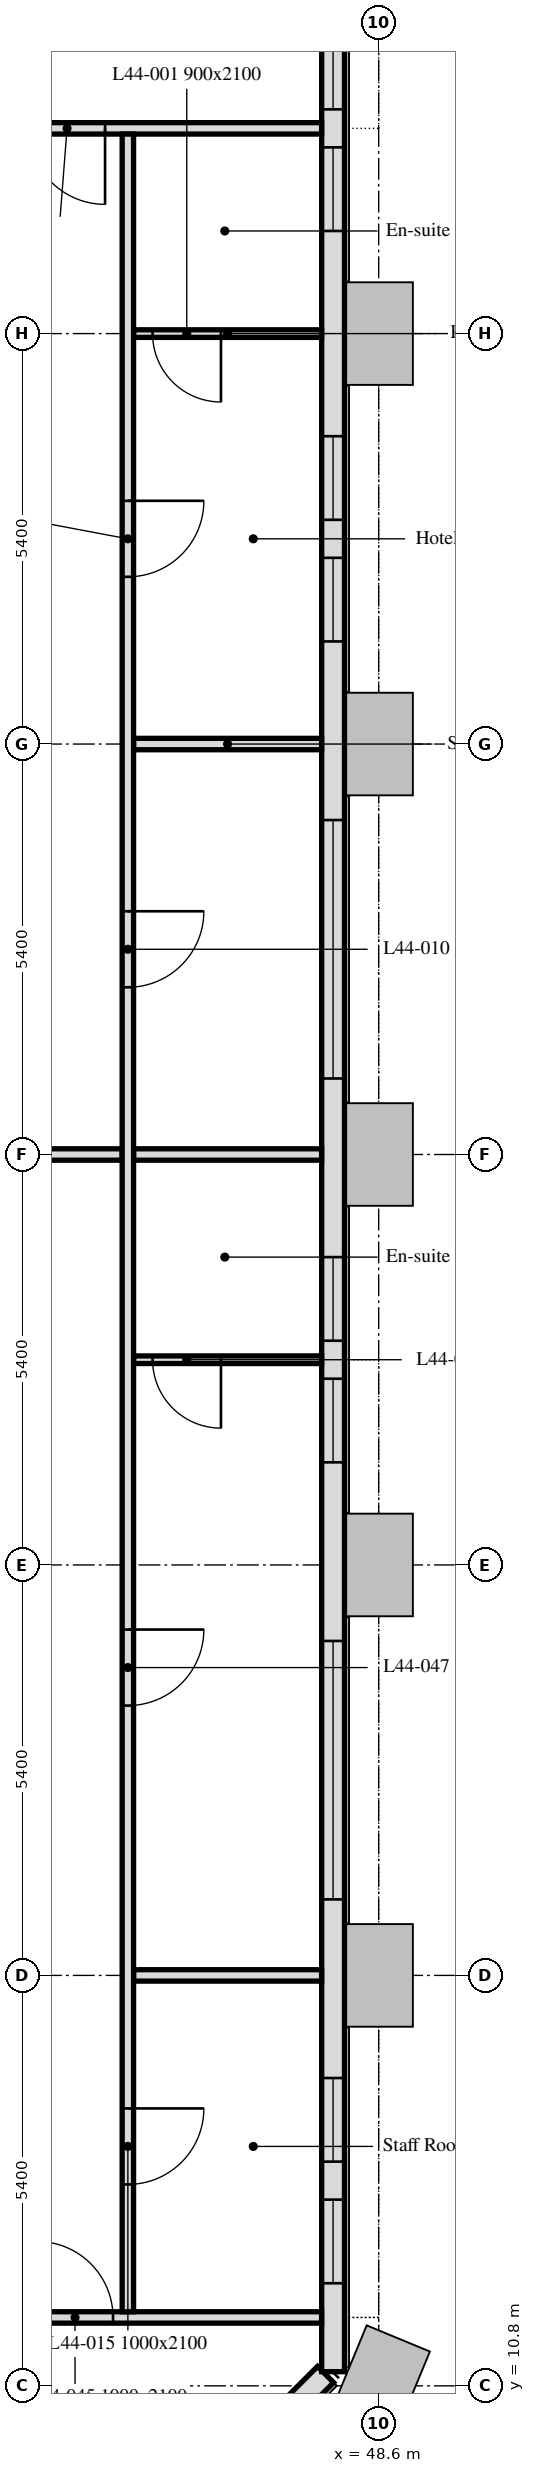
"""IFC4 building model, lengths in metres.
Left out: names, types, materials, properties, quantities, classifications, styles, units other than length and angle.
Written with IfcOpenShell. Run it as: python <this file> out.ifc"""

import sys

from ifc_helpers import new_model, si_unit, direction, frame, frame_2d, origin, place, context, subcontext, project, spatial, rectangle, extrude, element, fill, save


model = new_model("IFC4")
c1 = context("Model", 3, precision=1e-05, world=origin(), true_north=direction((0.0, 1.0)))
c2 = subcontext(c1, "Body", "Model", "MODEL_VIEW")
j1 = project(units=[si_unit("LENGTHUNIT", "METRE"), si_unit("PLANEANGLEUNIT", "RADIAN")], contexts=[c1])
p1 = place(None, origin())
s1 = spatial("IfcSite", under=j1, at=p1, CompositionType="ELEMENT")
p2 = place(p1, origin())
s2 = spatial("IfcBuilding", under=s1, at=p2, CompositionType="ELEMENT")
p3 = place(p2, frame((0.0, 0.0, 184.0)))
s3 = spatial("IfcBuildingStorey", under=s2, at=p3, CompositionType="ELEMENT", Elevation=184.0)
p4 = place(p3, frame((43.051, 6.099, 0.0), z_axis=(0.0, 0.0, 1.0), x_axis=(0.707106781187, 0.707106781187, 0.0)))
e1 = element("IfcWall", 1, at=p4, inside=s3, PredefinedType="SOLIDWALL", context=c2, shape_type="SweptSolid", body=[
    extrude(rectangle(XDim=6.86, YDim=0.3, at=frame_2d((3.43, 0.0))), origin(), (0.0, 0.0, 1.0), 3.0),
])
p5 = place(p4, frame((1.28, 0.0, 0.9)))
e2 = element("IfcOpeningElement", 2, at=p5, cuts=e1, PredefinedType="OPENING", context=c2, shape_type="SweptSolid", body=[
    extrude(rectangle(XDim=1.1, YDim=1.7, at=frame_2d((0.55, 0.85))), frame((0.0, 0.16, 0.0), z_axis=(0.0, -1.0, 0.0), x_axis=(1.0, 0.0, 0.0)), (0.0, 0.0, 1.0), 0.32),
])
p6 = place(p4, frame((4.48, 0.0, 0.9)))
e3 = element("IfcOpeningElement", 3, at=p6, cuts=e1, PredefinedType="OPENING", context=c2, shape_type="SweptSolid", body=[
    extrude(rectangle(XDim=1.1, YDim=1.7, at=frame_2d((0.55, 0.85))), frame((0.0, 0.16, 0.0), z_axis=(0.0, -1.0, 0.0), x_axis=(1.0, 0.0, 0.0)), (0.0, 0.0, 1.0), 0.32),
])
p7 = place(p3, frame((48.0, 10.986, 0.0), z_axis=(0.0, 0.0, 1.0), x_axis=(0.0, 1.0, 0.0)))
e4 = element("IfcWall", 4, at=p7, inside=s3, PredefinedType="SOLIDWALL", context=c2, shape_type="SweptSolid", body=[
    extrude(rectangle(XDim=32.027, YDim=0.3, at=frame_2d((16.014, 0.0))), origin(), (0.0, 0.0, 1.0), 3.0),
])
p8 = place(p7, frame((1.164, 0.0, 0.9)))
e5 = element("IfcOpeningElement", 5, at=p8, cuts=e4, PredefinedType="OPENING", context=c2, shape_type="SweptSolid", body=[
    extrude(rectangle(XDim=1.1, YDim=1.7, at=frame_2d((0.55, 0.85))), frame((0.0, 0.16, 0.0), z_axis=(0.0, -1.0, 0.0), x_axis=(1.0, 0.0, 0.0)), (0.0, 0.0, 1.0), 0.32),
])
p9 = place(p7, frame((2.764, 0.0, 0.9)))
e6 = element("IfcOpeningElement", 6, at=p9, cuts=e4, PredefinedType="OPENING", context=c2, shape_type="SweptSolid", body=[
    extrude(rectangle(XDim=1.1, YDim=1.7, at=frame_2d((0.55, 0.85))), frame((0.0, 0.16, 0.0), z_axis=(0.0, -1.0, 0.0), x_axis=(1.0, 0.0, 0.0)), (0.0, 0.0, 1.0), 0.32),
])
p10 = place(p7, frame((6.214, 0.0, 0.9)))
e7 = element("IfcOpeningElement", 7, at=p10, cuts=e4, PredefinedType="OPENING", context=c2, shape_type="SweptSolid", body=[
    extrude(rectangle(XDim=3.4, YDim=1.7, at=frame_2d((1.7, 0.85))), frame((0.0, 0.16, 0.0), z_axis=(0.0, -1.0, 0.0), x_axis=(1.0, 0.0, 0.0)), (0.0, 0.0, 1.0), 0.32),
])
p11 = place(p7, frame((11.964, 0.0, 0.9)))
e8 = element("IfcOpeningElement", 8, at=p11, cuts=e4, PredefinedType="OPENING", context=c2, shape_type="SweptSolid", body=[
    extrude(rectangle(XDim=1.1, YDim=1.7, at=frame_2d((0.55, 0.85))), frame((0.0, 0.16, 0.0), z_axis=(0.0, -1.0, 0.0), x_axis=(1.0, 0.0, 0.0)), (0.0, 0.0, 1.0), 0.32),
])
p12 = place(p7, frame((13.564, 0.0, 0.9)))
e9 = element("IfcOpeningElement", 9, at=p12, cuts=e4, PredefinedType="OPENING", context=c2, shape_type="SweptSolid", body=[
    extrude(rectangle(XDim=1.1, YDim=1.7, at=frame_2d((0.55, 0.85))), frame((0.0, 0.16, 0.0), z_axis=(0.0, -1.0, 0.0), x_axis=(1.0, 0.0, 0.0)), (0.0, 0.0, 1.0), 0.32),
])
p13 = place(p7, frame((17.014, 0.0, 0.9)))
e10 = element("IfcOpeningElement", 10, at=p13, cuts=e4, PredefinedType="OPENING", context=c2, shape_type="SweptSolid", body=[
    extrude(rectangle(XDim=3.4, YDim=1.7, at=frame_2d((1.7, 0.85))), frame((0.0, 0.16, 0.0), z_axis=(0.0, -1.0, 0.0), x_axis=(1.0, 0.0, 0.0)), (0.0, 0.0, 1.0), 0.32),
])
p14 = place(p7, frame((22.764, 0.0, 0.9)))
e11 = element("IfcOpeningElement", 11, at=p14, cuts=e4, PredefinedType="OPENING", context=c2, shape_type="SweptSolid", body=[
    extrude(rectangle(XDim=1.1, YDim=1.7, at=frame_2d((0.55, 0.85))), frame((0.0, 0.16, 0.0), z_axis=(0.0, -1.0, 0.0), x_axis=(1.0, 0.0, 0.0)), (0.0, 0.0, 1.0), 0.32),
])
p15 = place(p7, frame((24.364, 0.0, 0.9)))
e12 = element("IfcOpeningElement", 12, at=p15, cuts=e4, PredefinedType="OPENING", context=c2, shape_type="SweptSolid", body=[
    extrude(rectangle(XDim=1.1, YDim=1.7, at=frame_2d((0.55, 0.85))), frame((0.0, 0.16, 0.0), z_axis=(0.0, -1.0, 0.0), x_axis=(1.0, 0.0, 0.0)), (0.0, 0.0, 1.0), 0.32),
])
p16 = place(p7, frame((28.164, 0.0, 0.9)))
e13 = element("IfcOpeningElement", 13, at=p16, cuts=e4, PredefinedType="OPENING", context=c2, shape_type="SweptSolid", body=[
    extrude(rectangle(XDim=1.1, YDim=1.7, at=frame_2d((0.55, 0.85))), frame((0.0, 0.16, 0.0), z_axis=(0.0, -1.0, 0.0), x_axis=(1.0, 0.0, 0.0)), (0.0, 0.0, 1.0), 0.32),
])
p17 = place(p7, frame((29.764, 0.0, 0.9)))
e14 = element("IfcOpeningElement", 14, at=p17, cuts=e4, PredefinedType="OPENING", context=c2, shape_type="SweptSolid", body=[
    extrude(rectangle(XDim=1.1, YDim=1.7, at=frame_2d((0.55, 0.85))), frame((0.0, 0.16, 0.0), z_axis=(0.0, -1.0, 0.0), x_axis=(1.0, 0.0, 0.0)), (0.0, 0.0, 1.0), 0.32),
])
p18 = place(p3, frame((45.375, 32.4, 0.0), z_axis=(0.0, 0.0, 1.0), x_axis=(1.0, 0.0, 0.0)))
e15 = element("IfcWall", 15, at=p18, inside=s3, PredefinedType="PARTITIONING", context=c2, shape_type="SweptSolid", body=[
    extrude(rectangle(XDim=2.474, YDim=0.15, at=frame_2d((1.237, 0.0))), origin(), (0.0, 0.0, 1.0), 2.4),
])
p19 = place(p3, frame((47.849, 37.8, 0.0), z_axis=(0.0, 0.0, 1.0), x_axis=(-1.0, 0.0, 0.0)))
e16 = element("IfcWall", 16, at=p19, inside=s3, PredefinedType="PARTITIONING", context=c2, shape_type="SweptSolid", body=[
    extrude(rectangle(XDim=2.474, YDim=0.1, at=frame_2d((1.237, 0.0))), origin(), (0.0, 0.0, 1.0), 2.4),
])
p20 = place(p19, frame((1.324, 0.0, 0.0)))
e17 = element("IfcOpeningElement", 17, at=p20, cuts=e16, PredefinedType="OPENING", context=c2, shape_type="SweptSolid", body=[
    extrude(rectangle(XDim=0.9, YDim=2.1, at=frame_2d((0.45, 1.05))), frame((0.0, 0.05, 0.0), z_axis=(0.0, -1.0, 0.0), x_axis=(1.0, 0.0, 0.0)), (0.0, 0.0, 1.0), 0.1),
])
p21 = place(p3, frame((47.849, 40.5, 0.0), z_axis=(0.0, 0.0, 1.0), x_axis=(-1.0, 0.0, 0.0)))
e18 = element("IfcWall", 18, at=p21, inside=s3, PredefinedType="PARTITIONING", context=c2, shape_type="SweptSolid", body=[
    extrude(rectangle(XDim=41.698, YDim=0.15, at=frame_2d((20.849, 0.0))), origin(), (0.0, 0.0, 1.0), 2.4),
])
p22 = place(p21, frame((37.899, 0.0, 0.0)))
e19 = element("IfcOpeningElement", 19, at=p22, cuts=e18, PredefinedType="OPENING", context=c2, shape_type="SweptSolid", body=[
    extrude(rectangle(XDim=1.0, YDim=2.1, at=frame_2d((0.5, 1.05))), frame((0.0, 0.075, 0.0), z_axis=(0.0, -1.0, 0.0), x_axis=(1.0, 0.0, 0.0)), (0.0, 0.0, 1.0), 0.15),
])
p23 = place(p21, frame((32.499, 0.0, 0.0)))
e20 = element("IfcOpeningElement", 20, at=p23, cuts=e18, PredefinedType="OPENING", context=c2, shape_type="SweptSolid", body=[
    extrude(rectangle(XDim=1.0, YDim=2.1, at=frame_2d((0.5, 1.05))), frame((0.0, 0.075, 0.0), z_axis=(0.0, -1.0, 0.0), x_axis=(1.0, 0.0, 0.0)), (0.0, 0.0, 1.0), 0.15),
])
p24 = place(p21, frame((27.099, 0.0, 0.0)))
e21 = element("IfcOpeningElement", 21, at=p24, cuts=e18, PredefinedType="OPENING", context=c2, shape_type="SweptSolid", body=[
    extrude(rectangle(XDim=1.0, YDim=2.1, at=frame_2d((0.5, 1.05))), frame((0.0, 0.075, 0.0), z_axis=(0.0, -1.0, 0.0), x_axis=(1.0, 0.0, 0.0)), (0.0, 0.0, 1.0), 0.15),
])
p25 = place(p21, frame((21.699, 0.0, 0.0)))
e22 = element("IfcOpeningElement", 22, at=p25, cuts=e18, PredefinedType="OPENING", context=c2, shape_type="SweptSolid", body=[
    extrude(rectangle(XDim=1.0, YDim=2.1, at=frame_2d((0.5, 1.05))), frame((0.0, 0.075, 0.0), z_axis=(0.0, -1.0, 0.0), x_axis=(1.0, 0.0, 0.0)), (0.0, 0.0, 1.0), 0.15),
])
p26 = place(p21, frame((16.299, 0.0, 0.0)))
e23 = element("IfcOpeningElement", 23, at=p26, cuts=e18, PredefinedType="OPENING", context=c2, shape_type="SweptSolid", body=[
    extrude(rectangle(XDim=1.0, YDim=2.1, at=frame_2d((0.5, 1.05))), frame((0.0, 0.075, 0.0), z_axis=(0.0, -1.0, 0.0), x_axis=(1.0, 0.0, 0.0)), (0.0, 0.0, 1.0), 0.15),
])
p27 = place(p21, frame((10.899, 0.0, 0.0)))
e24 = element("IfcOpeningElement", 24, at=p27, cuts=e18, PredefinedType="OPENING", context=c2, shape_type="SweptSolid", body=[
    extrude(rectangle(XDim=1.0, YDim=2.1, at=frame_2d((0.5, 1.05))), frame((0.0, 0.075, 0.0), z_axis=(0.0, -1.0, 0.0), x_axis=(1.0, 0.0, 0.0)), (0.0, 0.0, 1.0), 0.15),
])
p28 = place(p21, frame((2.849, 0.0, 0.0)))
e25 = element("IfcOpeningElement", 25, at=p28, cuts=e18, PredefinedType="OPENING", context=c2, shape_type="SweptSolid", body=[
    extrude(rectangle(XDim=1.0, YDim=2.1, at=frame_2d((0.5, 1.05))), frame((0.0, 0.075, 0.0), z_axis=(0.0, -1.0, 0.0), x_axis=(1.0, 0.0, 0.0)), (0.0, 0.0, 1.0), 0.15),
])
p29 = place(p3, frame((45.375, 27.0, 0.0), z_axis=(0.0, 0.0, 1.0), x_axis=(1.0, 0.0, 0.0)))
e26 = element("IfcWall", 26, at=p29, inside=s3, PredefinedType="PARTITIONING", context=c2, shape_type="SweptSolid", body=[
    extrude(rectangle(XDim=2.474, YDim=0.15, at=frame_2d((1.237, 0.0))), origin(), (0.0, 0.0, 1.0), 2.4),
])
p30 = place(p3, frame((43.2, 27.0, 0.0), z_axis=(0.0, 0.0, 1.0), x_axis=(1.0, 0.0, 0.0)))
e27 = element("IfcWall", 27, at=p30, inside=s3, PredefinedType="PARTITIONING", context=c2, shape_type="SweptSolid", body=[
    extrude(rectangle(XDim=2.025, YDim=0.15, at=frame_2d((1.013, 0.0))), origin(), (0.0, 0.0, 1.0), 2.4),
])
p31 = place(p3, frame((47.849, 16.2, 0.0), z_axis=(0.0, 0.0, 1.0), x_axis=(-1.0, 0.0, 0.0)))
e28 = element("IfcWall", 28, at=p31, inside=s3, PredefinedType="PARTITIONING", context=c2, shape_type="SweptSolid", body=[
    extrude(rectangle(XDim=2.474, YDim=0.15, at=frame_2d((1.237, 0.0))), origin(), (0.0, 0.0, 1.0), 2.4),
])
p32 = place(p3, frame((6.151, 11.7, 0.0), z_axis=(0.0, 0.0, 1.0), x_axis=(1.0, 0.0, 0.0)))
e29 = element("IfcWall", 29, at=p32, inside=s3, PredefinedType="PARTITIONING", context=c2, shape_type="SweptSolid", body=[
    extrude(rectangle(XDim=41.698, YDim=0.15, at=frame_2d((20.849, 0.0))), origin(), (0.0, 0.0, 1.0), 3.0),
])
p33 = place(p32, frame((1.449, 0.0, 0.0)))
e30 = element("IfcOpeningElement", 30, at=p33, cuts=e29, PredefinedType="OPENING", context=c2, shape_type="SweptSolid", body=[
    extrude(rectangle(XDim=1.0, YDim=2.1, at=frame_2d((0.5, 1.05))), frame((0.0, 0.075, 0.0), z_axis=(0.0, -1.0, 0.0), x_axis=(1.0, 0.0, 0.0)), (0.0, 0.0, 1.0), 0.15),
])
p34 = place(p32, frame((37.954, 0.0, 0.0)))
e31 = element("IfcOpeningElement", 31, at=p34, cuts=e29, PredefinedType="OPENING", context=c2, shape_type="SweptSolid", body=[
    extrude(rectangle(XDim=1.0, YDim=2.1, at=frame_2d((0.5, 1.05))), frame((0.0, 0.075, 0.0), z_axis=(0.0, -1.0, 0.0), x_axis=(1.0, 0.0, 0.0)), (0.0, 0.0, 1.0), 0.15),
])
p35 = place(p32, frame((12.449, 0.0, 0.0)))
e32 = element("IfcOpeningElement", 32, at=p35, cuts=e29, PredefinedType="OPENING", context=c2, shape_type="SweptSolid", body=[
    extrude(rectangle(XDim=1.0, YDim=2.1, at=frame_2d((0.5, 1.05))), frame((0.0, 0.075, 0.0), z_axis=(0.0, -1.0, 0.0), x_axis=(1.0, 0.0, 0.0)), (0.0, 0.0, 1.0), 0.15),
])
p36 = place(p32, frame((23.249, 0.0, 0.0)))
e33 = element("IfcOpeningElement", 33, at=p36, cuts=e29, PredefinedType="OPENING", context=c2, shape_type="SweptSolid", body=[
    extrude(rectangle(XDim=1.0, YDim=2.1, at=frame_2d((0.5, 1.05))), frame((0.0, 0.075, 0.0), z_axis=(0.0, -1.0, 0.0), x_axis=(1.0, 0.0, 0.0)), (0.0, 0.0, 1.0), 0.15),
])
p37 = place(p3, frame((47.849, 24.3, 0.0), z_axis=(0.0, 0.0, 1.0), x_axis=(-1.0, 0.0, 0.0)))
e34 = element("IfcWall", 34, at=p37, inside=s3, PredefinedType="PARTITIONING", context=c2, shape_type="SweptSolid", body=[
    extrude(rectangle(XDim=2.474, YDim=0.1, at=frame_2d((1.237, 0.0))), origin(), (0.0, 0.0, 1.0), 3.0),
])
p38 = place(p37, frame((1.324, 0.0, 0.0)))
e35 = element("IfcOpeningElement", 35, at=p38, cuts=e34, PredefinedType="OPENING", context=c2, shape_type="SweptSolid", body=[
    extrude(rectangle(XDim=0.9, YDim=2.1, at=frame_2d((0.45, 1.05))), frame((0.0, 0.05, 0.0), z_axis=(0.0, -1.0, 0.0), x_axis=(1.0, 0.0, 0.0)), (0.0, 0.0, 1.0), 0.1),
])
p39 = place(p3, frame((45.3, 40.425, 0.0), z_axis=(0.0, 0.0, 1.0), x_axis=(0.0, -1.0, 0.0)))
e36 = element("IfcWall", 36, at=p39, inside=s3, PredefinedType="PARTITIONING", context=c2, shape_type="SweptSolid", body=[
    extrude(rectangle(XDim=28.65, YDim=0.15, at=frame_2d((14.325, 0.0))), origin(), (0.0, 0.0, 1.0), 2.4),
])
p40 = place(p39, frame((10.225, 0.0, 0.0)))
e37 = element("IfcOpeningElement", 37, at=p40, cuts=e36, PredefinedType="OPENING", context=c2, shape_type="SweptSolid", body=[
    extrude(rectangle(XDim=1.0, YDim=2.1, at=frame_2d((0.5, 1.05))), frame((0.0, 0.075, 0.0), z_axis=(0.0, -1.0, 0.0), x_axis=(1.0, 0.0, 0.0)), (0.0, 0.0, 1.0), 0.15),
])
p41 = place(p39, frame((25.975, 0.0, 0.0)))
e38 = element("IfcOpeningElement", 38, at=p41, cuts=e36, PredefinedType="OPENING", context=c2, shape_type="SweptSolid", body=[
    extrude(rectangle(XDim=1.0, YDim=2.1, at=frame_2d((0.5, 1.05))), frame((0.0, 0.075, 0.0), z_axis=(0.0, -1.0, 0.0), x_axis=(1.0, 0.0, 0.0)), (0.0, 0.0, 1.0), 0.15),
])
p42 = place(p39, frame((4.825, 0.0, 0.0)))
e39 = element("IfcOpeningElement", 39, at=p42, cuts=e36, PredefinedType="OPENING", context=c2, shape_type="SweptSolid", body=[
    extrude(rectangle(XDim=1.0, YDim=2.1, at=frame_2d((0.5, 1.05))), frame((0.0, 0.075, 0.0), z_axis=(0.0, -1.0, 0.0), x_axis=(1.0, 0.0, 0.0)), (0.0, 0.0, 1.0), 0.15),
])
p43 = place(p39, frame((19.675, 0.0, 0.0)))
e40 = element("IfcOpeningElement", 40, at=p43, cuts=e36, PredefinedType="OPENING", context=c2, shape_type="SweptSolid", body=[
    extrude(rectangle(XDim=1.0, YDim=2.1, at=frame_2d((0.5, 1.05))), frame((0.0, 0.075, 0.0), z_axis=(0.0, -1.0, 0.0), x_axis=(1.0, 0.0, 0.0)), (0.0, 0.0, 1.0), 0.15),
])
p44 = place(p8, origin())
e41 = element("IfcWindow", 41, at=p44, inside=s3, PartitioningType="SINGLE_PANEL", PredefinedType="WINDOW", context=c2, shape_type="SweptSolid", body=[
    extrude(rectangle(XDim=1.1, YDim=1.7, at=frame_2d((0.55, 0.85))), frame((0.0, 0.03, 0.0), z_axis=(0.0, -1.0, 0.0), x_axis=(1.0, 0.0, 0.0)), (0.0, 0.0, 1.0), 0.06),
])
fill(e5, e41)
p45 = place(p9, origin())
e42 = element("IfcWindow", 42, at=p45, inside=s3, PartitioningType="SINGLE_PANEL", PredefinedType="WINDOW", context=c2, shape_type="SweptSolid", body=[
    extrude(rectangle(XDim=1.1, YDim=1.7, at=frame_2d((0.55, 0.85))), frame((0.0, 0.03, 0.0), z_axis=(0.0, -1.0, 0.0), x_axis=(1.0, 0.0, 0.0)), (0.0, 0.0, 1.0), 0.06),
])
fill(e6, e42)
p46 = place(p10, origin())
e43 = element("IfcWindow", 43, at=p46, inside=s3, PartitioningType="SINGLE_PANEL", PredefinedType="WINDOW", context=c2, shape_type="SweptSolid", body=[
    extrude(rectangle(XDim=3.4, YDim=1.7, at=frame_2d((1.7, 0.85))), frame((0.0, 0.03, 0.0), z_axis=(0.0, -1.0, 0.0), x_axis=(1.0, 0.0, 0.0)), (0.0, 0.0, 1.0), 0.06),
])
fill(e7, e43)
p47 = place(p11, origin())
e44 = element("IfcWindow", 44, at=p47, inside=s3, PartitioningType="SINGLE_PANEL", PredefinedType="WINDOW", context=c2, shape_type="SweptSolid", body=[
    extrude(rectangle(XDim=1.1, YDim=1.7, at=frame_2d((0.55, 0.85))), frame((0.0, 0.03, 0.0), z_axis=(0.0, -1.0, 0.0), x_axis=(1.0, 0.0, 0.0)), (0.0, 0.0, 1.0), 0.06),
])
fill(e8, e44)
p48 = place(p12, origin())
e45 = element("IfcWindow", 45, at=p48, inside=s3, PartitioningType="SINGLE_PANEL", PredefinedType="WINDOW", context=c2, shape_type="SweptSolid", body=[
    extrude(rectangle(XDim=1.1, YDim=1.7, at=frame_2d((0.55, 0.85))), frame((0.0, 0.03, 0.0), z_axis=(0.0, -1.0, 0.0), x_axis=(1.0, 0.0, 0.0)), (0.0, 0.0, 1.0), 0.06),
])
fill(e9, e45)
p49 = place(p13, origin())
e46 = element("IfcWindow", 46, at=p49, inside=s3, PartitioningType="SINGLE_PANEL", PredefinedType="WINDOW", context=c2, shape_type="SweptSolid", body=[
    extrude(rectangle(XDim=3.4, YDim=1.7, at=frame_2d((1.7, 0.85))), frame((0.0, 0.03, 0.0), z_axis=(0.0, -1.0, 0.0), x_axis=(1.0, 0.0, 0.0)), (0.0, 0.0, 1.0), 0.06),
])
fill(e10, e46)
p50 = place(p14, origin())
e47 = element("IfcWindow", 47, at=p50, inside=s3, PartitioningType="SINGLE_PANEL", PredefinedType="WINDOW", context=c2, shape_type="SweptSolid", body=[
    extrude(rectangle(XDim=1.1, YDim=1.7, at=frame_2d((0.55, 0.85))), frame((0.0, 0.03, 0.0), z_axis=(0.0, -1.0, 0.0), x_axis=(1.0, 0.0, 0.0)), (0.0, 0.0, 1.0), 0.06),
])
fill(e11, e47)
p51 = place(p15, origin())
e48 = element("IfcWindow", 48, at=p51, inside=s3, PartitioningType="SINGLE_PANEL", PredefinedType="WINDOW", context=c2, shape_type="SweptSolid", body=[
    extrude(rectangle(XDim=1.1, YDim=1.7, at=frame_2d((0.55, 0.85))), frame((0.0, 0.03, 0.0), z_axis=(0.0, -1.0, 0.0), x_axis=(1.0, 0.0, 0.0)), (0.0, 0.0, 1.0), 0.06),
])
fill(e12, e48)
p52 = place(p16, origin())
e49 = element("IfcWindow", 49, at=p52, inside=s3, PartitioningType="SINGLE_PANEL", PredefinedType="WINDOW", context=c2, shape_type="SweptSolid", body=[
    extrude(rectangle(XDim=1.1, YDim=1.7, at=frame_2d((0.55, 0.85))), frame((0.0, 0.03, 0.0), z_axis=(0.0, -1.0, 0.0), x_axis=(1.0, 0.0, 0.0)), (0.0, 0.0, 1.0), 0.06),
])
fill(e13, e49)
p53 = place(p17, origin())
e50 = element("IfcWindow", 50, at=p53, inside=s3, PartitioningType="SINGLE_PANEL", PredefinedType="WINDOW", context=c2, shape_type="SweptSolid", body=[
    extrude(rectangle(XDim=1.1, YDim=1.7, at=frame_2d((0.55, 0.85))), frame((0.0, 0.03, 0.0), z_axis=(0.0, -1.0, 0.0), x_axis=(1.0, 0.0, 0.0)), (0.0, 0.0, 1.0), 0.06),
])
fill(e14, e50)
p54 = place(p20, origin())
e51 = element("IfcDoor", 51, at=p54, inside=s3, OperationType="SINGLE_SWING_LEFT", PredefinedType="DOOR", context=c2, shape_type="SweptSolid", body=[
    extrude(rectangle(XDim=0.9, YDim=2.1, at=frame_2d((0.45, 1.05))), frame((0.0, 0.025, 0.0), z_axis=(0.0, -1.0, 0.0), x_axis=(1.0, 0.0, 0.0)), (0.0, 0.0, 1.0), 0.05),
])
fill(e17, e51)
p55 = place(p40, origin())
e52 = element("IfcDoor", 52, at=p55, inside=s3, OperationType="SINGLE_SWING_RIGHT", PredefinedType="DOOR", context=c2, shape_type="SweptSolid", body=[
    extrude(rectangle(XDim=1.0, YDim=2.1, at=frame_2d((0.5, 1.05))), frame((0.0, 0.025, 0.0), z_axis=(0.0, -1.0, 0.0), x_axis=(1.0, 0.0, 0.0)), (0.0, 0.0, 1.0), 0.05),
])
fill(e37, e52)
p56 = place(p41, origin())
e53 = element("IfcDoor", 53, at=p56, inside=s3, OperationType="SINGLE_SWING_LEFT", PredefinedType="DOOR", context=c2, shape_type="SweptSolid", body=[
    extrude(rectangle(XDim=1.0, YDim=2.1, at=frame_2d((0.5, 1.05))), frame((0.0, 0.025, 0.0), z_axis=(0.0, -1.0, 0.0), x_axis=(1.0, 0.0, 0.0)), (0.0, 0.0, 1.0), 0.05),
])
fill(e38, e53)
p57 = place(p38, origin())
e54 = element("IfcDoor", 54, at=p57, inside=s3, OperationType="SINGLE_SWING_RIGHT", PredefinedType="DOOR", context=c2, shape_type="SweptSolid", body=[
    extrude(rectangle(XDim=0.9, YDim=2.1, at=frame_2d((0.45, 1.05))), frame((0.0, 0.025, 0.0), z_axis=(0.0, -1.0, 0.0), x_axis=(1.0, 0.0, 0.0)), (0.0, 0.0, 1.0), 0.05),
])
fill(e35, e54)
p58 = place(p42, origin())
e55 = element("IfcDoor", 55, at=p58, inside=s3, OperationType="SINGLE_SWING_LEFT", PredefinedType="DOOR", context=c2, shape_type="SweptSolid", body=[
    extrude(rectangle(XDim=1.0, YDim=2.1, at=frame_2d((0.5, 1.05))), frame((0.0, 0.025, 0.0), z_axis=(0.0, -1.0, 0.0), x_axis=(1.0, 0.0, 0.0)), (0.0, 0.0, 1.0), 0.05),
])
fill(e39, e55)
p59 = place(p28, origin())
e56 = element("IfcDoor", 56, at=p59, inside=s3, OperationType="SINGLE_SWING_LEFT", PredefinedType="DOOR", context=c2, shape_type="SweptSolid", body=[
    extrude(rectangle(XDim=1.0, YDim=2.1, at=frame_2d((0.5, 1.05))), frame((0.0, 0.025, 0.0), z_axis=(0.0, -1.0, 0.0), x_axis=(1.0, 0.0, 0.0)), (0.0, 0.0, 1.0), 0.05),
])
fill(e25, e56)
p60 = place(p34, origin())
e57 = element("IfcDoor", 57, at=p60, inside=s3, OperationType="SINGLE_SWING_RIGHT", PredefinedType="DOOR", context=c2, shape_type="SweptSolid", body=[
    extrude(rectangle(XDim=1.0, YDim=2.1, at=frame_2d((0.5, 1.05))), frame((0.0, 0.025, 0.0), z_axis=(0.0, -1.0, 0.0), x_axis=(1.0, 0.0, 0.0)), (0.0, 0.0, 1.0), 0.05),
])
fill(e31, e57)
p61 = place(p43, origin())
e58 = element("IfcDoor", 58, at=p61, inside=s3, OperationType="SINGLE_SWING_LEFT", PredefinedType="DOOR", context=c2, shape_type="SweptSolid", body=[
    extrude(rectangle(XDim=1.0, YDim=2.1, at=frame_2d((0.5, 1.05))), frame((0.0, 0.025, 0.0), z_axis=(0.0, -1.0, 0.0), x_axis=(1.0, 0.0, 0.0)), (0.0, 0.0, 1.0), 0.05),
])
fill(e40, e58)
save(model, sys.argv[1])
